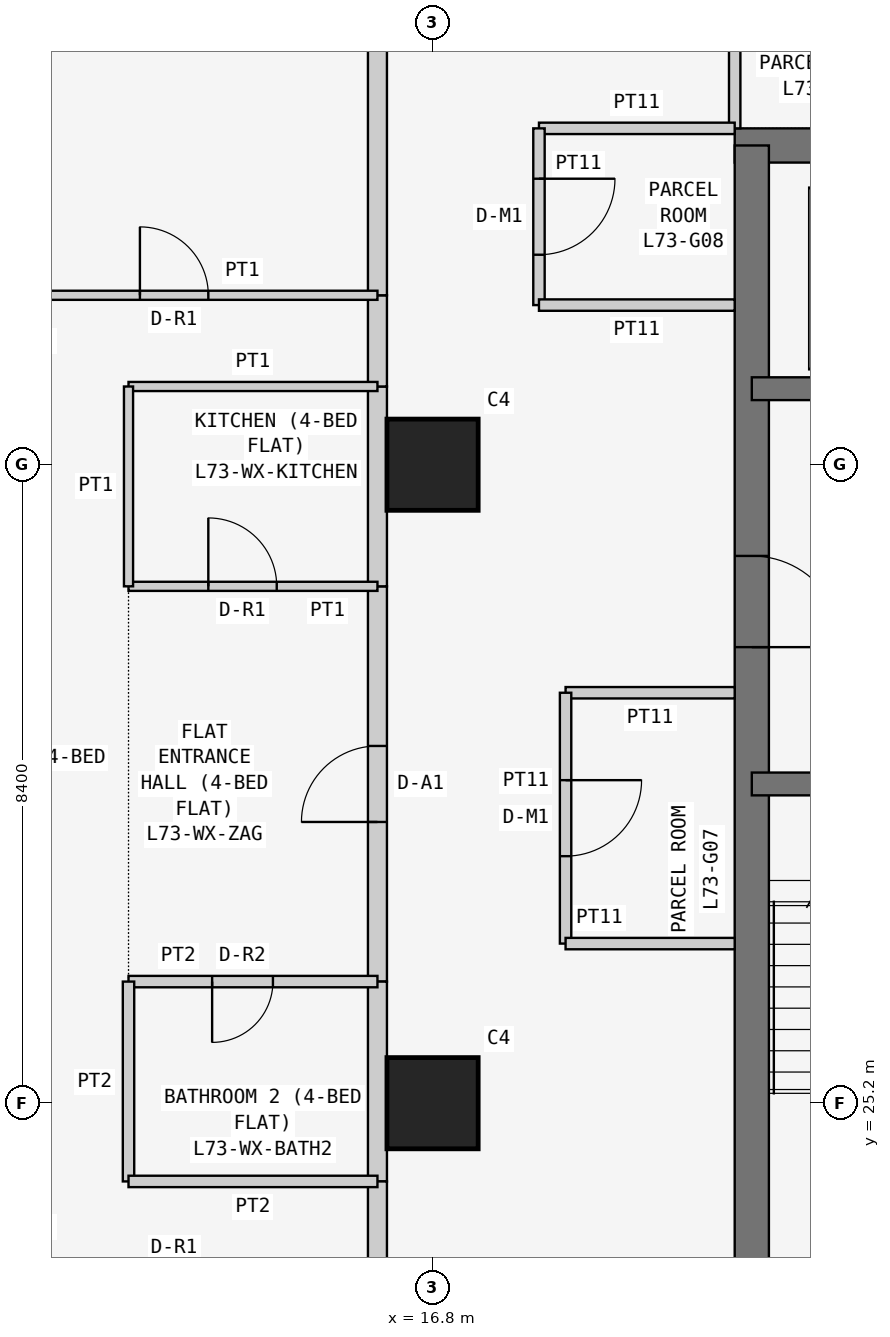
"""IFC4 building model, lengths in metres.
Left out: names, types, materials, properties, quantities, classifications, styles, units other than length and angle.
Written with IfcOpenShell. Run it as: python <this file> out.ifc"""

import sys

from ifc_helpers import new_model, si_unit, direction, frame, frame_2d, origin, origin_2d, place, context, subcontext, project, spatial, rectangle, extrude, element, fill, save


model = new_model("IFC4")
c1 = context("Model", 3, precision=1e-05, world=origin(), true_north=direction((0.0, 1.0)))
c2 = subcontext(c1, "Body", "Model", "MODEL_VIEW")
j1 = project(units=[si_unit("LENGTHUNIT", "METRE"), si_unit("PLANEANGLEUNIT", "RADIAN")], contexts=[c1])
p1 = place(None, origin())
s1 = spatial("IfcSite", under=j1, at=p1, CompositionType="ELEMENT")
p2 = place(p1, origin())
s2 = spatial("IfcBuilding", under=s1, at=p2, CompositionType="ELEMENT")
p3 = place(p2, frame((0.0, 0.0, 279.3)))
s3 = spatial("IfcBuildingStorey", under=s2, at=p3, CompositionType="ELEMENT", Elevation=279.3)
for number, where, z_axis, x_axis in (
    (1, (16.8, 25.2, 0.0), (0.0, 0.0, 1.0), (1.0, 0.0, 0.0)),
    (2, (16.8, 33.6, 0.0), (0.0, 0.0, 1.0), (1.0, 0.0, 0.0)),
):
    element("IfcColumn", number, at=place(p3, frame(where, z_axis=z_axis, x_axis=x_axis)), inside=s3, PredefinedType="COLUMN", context=c2, shape_type="SweptSolid", body=[
        extrude(rectangle(XDim=1.2, YDim=1.2, at=origin_2d()), origin(), (0.0, 0.0, 1.0), 3.6),
    ])
p4 = place(p3, frame((37.8, 37.8, 0.0), z_axis=(0.0, 0.0, 1.0), x_axis=(-1.0, 0.0, 0.0)))
e3 = element("IfcWall", 3, at=p4, inside=s3, PredefinedType="SHEAR", context=c2, shape_type="SweptSolid", body=[
    extrude(rectangle(XDim=17.025, YDim=0.45, at=frame_2d((8.513, 0.0))), origin(), (0.0, 0.0, 1.0), 3.6),
])
p5 = place(p3, frame((21.0, 37.8, 0.0), z_axis=(0.0, 0.0, 1.0), x_axis=(0.0, -1.0, 0.0)))
e4 = element("IfcWall", 4, at=p5, inside=s3, PredefinedType="SHEAR", context=c2, shape_type="SweptSolid", body=[
    extrude(rectangle(XDim=17.025, YDim=0.45, at=frame_2d((8.513, 0.0))), origin(), (0.0, 0.0, 1.0), 3.6),
])
p6 = place(p5, frame((5.4, 0.0, 0.0)))
e5 = element("IfcOpeningElement", 5, at=p6, cuts=e4, PredefinedType="OPENING", context=c2, shape_type="SweptSolid", body=[
    extrude(rectangle(XDim=1.2, YDim=2.1, at=frame_2d((0.6, 1.05))), frame((0.0, 0.235, 0.0), z_axis=(0.0, -1.0, 0.0), x_axis=(1.0, 0.0, 0.0)), (0.0, 0.0, 1.0), 0.47),
])
p7 = place(p3, frame((21.0, 29.4, 0.0), z_axis=(0.0, 0.0, 1.0), x_axis=(1.0, 0.0, 0.0)))
e6 = element("IfcWall", 6, at=p7, inside=s3, PredefinedType="SHEAR", context=c2, shape_type="SweptSolid", body=[
    extrude(rectangle(XDim=5.6, YDim=0.3, at=frame_2d((2.8, 0.0))), origin(), (0.0, 0.0, 1.0), 3.6),
])
p8 = place(p7, frame((2.3, 0.0, 0.0)))
e7 = element("IfcOpeningElement", 7, at=p8, cuts=e6, PredefinedType="OPENING", context=c2, shape_type="SweptSolid", body=[
    extrude(rectangle(XDim=1.2, YDim=2.1, at=frame_2d((0.6, 1.05))), frame((0.0, 0.16, 0.0), z_axis=(0.0, -1.0, 0.0), x_axis=(1.0, 0.0, 0.0)), (0.0, 0.0, 1.0), 0.32),
])
p9 = place(p3, frame((21.0, 34.6, 0.0), z_axis=(0.0, 0.0, 1.0), x_axis=(1.0, 0.0, 0.0)))
e8 = element("IfcWall", 8, at=p9, inside=s3, PredefinedType="SHEAR", context=c2, shape_type="SweptSolid", body=[
    extrude(rectangle(XDim=11.2, YDim=0.3, at=frame_2d((5.6, 0.0))), origin(), (0.0, 0.0, 1.0), 3.6),
])
p10 = place(p9, frame((9.35, 0.0, 0.0)))
e9 = element("IfcOpeningElement", 9, at=p10, cuts=e8, PredefinedType="OPENING", context=c2, shape_type="SweptSolid", body=[
    extrude(rectangle(XDim=0.9, YDim=2.1, at=frame_2d((0.45, 1.05))), frame((0.0, 0.16, 0.0), z_axis=(0.0, -1.0, 0.0), x_axis=(1.0, 0.0, 0.0)), (0.0, 0.0, 1.0), 0.32),
])
p11 = place(p9, frame((1.0, 0.0, 0.0)))
e10 = element("IfcOpeningElement", 10, at=p11, cuts=e8, PredefinedType="OPENING", context=c2, shape_type="SweptSolid", body=[
    extrude(rectangle(XDim=1.1, YDim=2.1, at=frame_2d((0.55, 1.05))), frame((0.0, 0.16, 0.0), z_axis=(0.0, -1.0, 0.0), x_axis=(1.0, 0.0, 0.0)), (0.0, 0.0, 1.0), 0.32),
])
p12 = place(p9, frame((3.65, 0.0, 0.0)))
e11 = element("IfcOpeningElement", 11, at=p12, cuts=e8, PredefinedType="OPENING", context=c2, shape_type="SweptSolid", body=[
    extrude(rectangle(XDim=1.1, YDim=2.1, at=frame_2d((0.55, 1.05))), frame((0.0, 0.16, 0.0), z_axis=(0.0, -1.0, 0.0), x_axis=(1.0, 0.0, 0.0)), (0.0, 0.0, 1.0), 0.32),
])
p13 = place(p9, frame((6.35, 0.0, 0.0)))
e12 = element("IfcOpeningElement", 12, at=p13, cuts=e8, PredefinedType="OPENING", context=c2, shape_type="SweptSolid", body=[
    extrude(rectangle(XDim=1.3, YDim=2.1, at=frame_2d((0.65, 1.05))), frame((0.0, 0.16, 0.0), z_axis=(0.0, -1.0, 0.0), x_axis=(1.0, 0.0, 0.0)), (0.0, 0.0, 1.0), 0.32),
])
p14 = place(p3, frame((20.775, 40.6, 0.0), z_axis=(0.0, 0.0, 1.0), x_axis=(0.0, -1.0, 0.0)))
e13 = element("IfcWall", 13, at=p14, inside=s3, PredefinedType="PARTITIONING", context=c2, shape_type="SweptSolid", body=[
    extrude(rectangle(XDim=2.575, YDim=0.15, at=frame_2d((1.288, 0.0))), origin(), (0.0, 0.0, 1.0), 3.45),
])
p15 = place(p3, frame((20.775, 30.6, 0.0), z_axis=(0.0, 0.0, 1.0), x_axis=(-1.0, 0.0, 0.0)))
e14 = element("IfcWall", 14, at=p15, inside=s3, PredefinedType="PARTITIONING", context=c2, shape_type="SweptSolid", body=[
    extrude(rectangle(XDim=2.225, YDim=0.15, at=frame_2d((1.112, 0.0))), origin(), (0.0, 0.0, 1.0), 3.45),
])
p16 = place(p3, frame((18.55, 30.6, 0.0), z_axis=(0.0, 0.0, 1.0), x_axis=(0.0, -1.0, 0.0)))
e15 = element("IfcWall", 15, at=p16, inside=s3, PredefinedType="PARTITIONING", context=c2, shape_type="SweptSolid", body=[
    extrude(rectangle(XDim=3.3, YDim=0.15, at=frame_2d((1.65, 0.0))), origin(), (0.0, 0.0, 1.0), 3.45),
])
p17 = place(p16, frame((1.15, 0.0, 0.0)))
e16 = element("IfcOpeningElement", 16, at=p17, cuts=e15, PredefinedType="OPENING", context=c2, shape_type="SweptSolid", body=[
    extrude(rectangle(XDim=1.0, YDim=2.1, at=frame_2d((0.5, 1.05))), frame((0.0, 0.085, 0.0), z_axis=(0.0, -1.0, 0.0), x_axis=(1.0, 0.0, 0.0)), (0.0, 0.0, 1.0), 0.17),
])
p18 = place(p3, frame((18.55, 27.3, 0.0), z_axis=(0.0, 0.0, 1.0), x_axis=(1.0, 0.0, 0.0)))
e17 = element("IfcWall", 17, at=p18, inside=s3, PredefinedType="PARTITIONING", context=c2, shape_type="SweptSolid", body=[
    extrude(rectangle(XDim=2.225, YDim=0.15, at=frame_2d((1.112, 0.0))), origin(), (0.0, 0.0, 1.0), 3.45),
])
p19 = place(p3, frame((20.775, 38.025, 0.0), z_axis=(0.0, 0.0, 1.0), x_axis=(-1.0, 0.0, 0.0)))
e18 = element("IfcWall", 18, at=p19, inside=s3, PredefinedType="PARTITIONING", context=c2, shape_type="SweptSolid", body=[
    extrude(rectangle(XDim=2.575, YDim=0.15, at=frame_2d((1.288, 0.0))), origin(), (0.0, 0.0, 1.0), 3.45),
])
p20 = place(p3, frame((18.2, 38.025, 0.0), z_axis=(0.0, 0.0, 1.0), x_axis=(0.0, -1.0, 0.0)))
e19 = element("IfcWall", 19, at=p20, inside=s3, PredefinedType="PARTITIONING", context=c2, shape_type="SweptSolid", body=[
    extrude(rectangle(XDim=2.325, YDim=0.15, at=frame_2d((1.163, 0.0))), origin(), (0.0, 0.0, 1.0), 3.45),
])
p21 = place(p20, frame((0.663, 0.0, 0.0)))
e20 = element("IfcOpeningElement", 20, at=p21, cuts=e19, PredefinedType="OPENING", context=c2, shape_type="SweptSolid", body=[
    extrude(rectangle(XDim=1.0, YDim=2.1, at=frame_2d((0.5, 1.05))), frame((0.0, 0.085, 0.0), z_axis=(0.0, -1.0, 0.0), x_axis=(1.0, 0.0, 0.0)), (0.0, 0.0, 1.0), 0.17),
])
p22 = place(p3, frame((18.2, 35.7, 0.0), z_axis=(0.0, 0.0, 1.0), x_axis=(1.0, 0.0, 0.0)))
e21 = element("IfcWall", 21, at=p22, inside=s3, PredefinedType="PARTITIONING", context=c2, shape_type="SweptSolid", body=[
    extrude(rectangle(XDim=2.575, YDim=0.15, at=frame_2d((1.288, 0.0))), origin(), (0.0, 0.0, 1.0), 3.45),
])
p23 = place(p3, frame((16.075, 26.8, 0.0), z_axis=(0.0, 0.0, 1.0), x_axis=(0.0, 1.0, 0.0)))
e22 = element("IfcWall", 22, at=p23, inside=s3, PredefinedType="PARTITIONING", context=c2, shape_type="SweptSolid", body=[
    extrude(rectangle(XDim=5.2, YDim=0.25, at=frame_2d((2.6, 0.0))), origin(), (0.0, 0.0, 1.0), 3.45),
])
p24 = place(p23, frame((2.1, 0.0, 0.0)))
e23 = element("IfcOpeningElement", 23, at=p24, cuts=e22, PredefinedType="OPENING", context=c2, shape_type="SweptSolid", body=[
    extrude(rectangle(XDim=1.0, YDim=2.1, at=frame_2d((0.5, 1.05))), frame((0.0, 0.135, 0.0), z_axis=(0.0, -1.0, 0.0), x_axis=(1.0, 0.0, 0.0)), (0.0, 0.0, 1.0), 0.27),
])
p25 = place(p3, frame((16.075, 24.171, 0.0), z_axis=(0.0, 0.0, 1.0), x_axis=(0.0, 1.0, 0.0)))
e24 = element("IfcWall", 24, at=p25, inside=s3, PredefinedType="PARTITIONING", context=c2, shape_type="SweptSolid", body=[
    extrude(rectangle(XDim=2.629, YDim=0.25, at=frame_2d((1.314, 0.0))), origin(), (0.0, 0.0, 1.0), 3.45),
])
p26 = place(p3, frame((16.075, 32.0, 0.0), z_axis=(0.0, 0.0, 1.0), x_axis=(0.0, 1.0, 0.0)))
e25 = element("IfcWall", 25, at=p26, inside=s3, PredefinedType="PARTITIONING", context=c2, shape_type="SweptSolid", body=[
    extrude(rectangle(XDim=2.629, YDim=0.25, at=frame_2d((1.314, 0.0))), origin(), (0.0, 0.0, 1.0), 3.45),
])
p27 = place(p3, frame((16.075, 22.971, 0.0), z_axis=(0.0, 0.0, 1.0), x_axis=(0.0, 1.0, 0.0)))
e26 = element("IfcWall", 26, at=p27, inside=s3, PredefinedType="PARTITIONING", context=c2, shape_type="SweptSolid", body=[
    extrude(rectangle(XDim=1.2, YDim=0.25, at=frame_2d((0.6, 0.0))), origin(), (0.0, 0.0, 1.0), 3.45),
])
p28 = place(p3, frame((16.075, 34.629, 0.0), z_axis=(0.0, 0.0, 1.0), x_axis=(0.0, 1.0, 0.0)))
e27 = element("IfcWall", 27, at=p28, inside=s3, PredefinedType="PARTITIONING", context=c2, shape_type="SweptSolid", body=[
    extrude(rectangle(XDim=1.2, YDim=0.25, at=frame_2d((0.6, 0.0))), origin(), (0.0, 0.0, 1.0), 3.45),
])
p29 = place(p3, frame((16.075, 35.829, 0.0), z_axis=(0.0, 0.0, 1.0), x_axis=(0.0, 1.0, 0.0)))
e28 = element("IfcWall", 28, at=p29, inside=s3, PredefinedType="PARTITIONING", context=c2, shape_type="SweptSolid", body=[
    extrude(rectangle(XDim=6.871, YDim=0.25, at=frame_2d((3.436, 0.0))), origin(), (0.0, 0.0, 1.0), 3.45),
])
p30 = place(p3, frame((12.8, 26.8, 0.0), z_axis=(0.0, 0.0, 1.0), x_axis=(1.0, 0.0, 0.0)))
e29 = element("IfcWall", 29, at=p30, inside=s3, PredefinedType="PARTITIONING", context=c2, shape_type="SweptSolid", body=[
    extrude(rectangle(XDim=3.275, YDim=0.15, at=frame_2d((1.637, 0.0))), origin(), (0.0, 0.0, 1.0), 3.45),
])
p31 = place(p30, frame((1.1, 0.0, 0.0)))
e30 = element("IfcOpeningElement", 30, at=p31, cuts=e29, PredefinedType="OPENING", context=c2, shape_type="SweptSolid", body=[
    extrude(rectangle(XDim=0.8, YDim=2.1, at=frame_2d((0.4, 1.05))), frame((0.0, 0.085, 0.0), z_axis=(0.0, -1.0, 0.0), x_axis=(1.0, 0.0, 0.0)), (0.0, 0.0, 1.0), 0.17),
])
p32 = place(p3, frame((16.075, 32.0, 0.0), z_axis=(0.0, 0.0, 1.0), x_axis=(-1.0, 0.0, 0.0)))
e31 = element("IfcWall", 31, at=p32, inside=s3, PredefinedType="PARTITIONING", context=c2, shape_type="SweptSolid", body=[
    extrude(rectangle(XDim=3.275, YDim=0.12, at=frame_2d((1.637, 0.0))), origin(), (0.0, 0.0, 1.0), 3.45),
])
p33 = place(p32, frame((1.325, 0.0, 0.0)))
e32 = element("IfcOpeningElement", 32, at=p33, cuts=e31, PredefinedType="OPENING", context=c2, shape_type="SweptSolid", body=[
    extrude(rectangle(XDim=0.9, YDim=2.1, at=frame_2d((0.45, 1.05))), frame((0.0, 0.07, 0.0), z_axis=(0.0, -1.0, 0.0), x_axis=(1.0, 0.0, 0.0)), (0.0, 0.0, 1.0), 0.14),
])
p34 = place(p3, frame((12.8, 26.8, 0.0), z_axis=(0.0, 0.0, 1.0), x_axis=(0.0, -1.0, 0.0)))
e33 = element("IfcWall", 33, at=p34, inside=s3, PredefinedType="PARTITIONING", context=c2, shape_type="SweptSolid", body=[
    extrude(rectangle(XDim=2.629, YDim=0.15, at=frame_2d((1.314, 0.0))), origin(), (0.0, 0.0, 1.0), 3.45),
])
p35 = place(p3, frame((12.8, 24.171, 0.0), z_axis=(0.0, 0.0, 1.0), x_axis=(1.0, 0.0, 0.0)))
e34 = element("IfcWall", 34, at=p35, inside=s3, PredefinedType="PARTITIONING", context=c2, shape_type="SweptSolid", body=[
    extrude(rectangle(XDim=3.275, YDim=0.15, at=frame_2d((1.637, 0.0))), origin(), (0.0, 0.0, 1.0), 3.45),
])
p36 = place(p3, frame((16.075, 34.629, 0.0), z_axis=(0.0, 0.0, 1.0), x_axis=(-1.0, 0.0, 0.0)))
e35 = element("IfcWall", 35, at=p36, inside=s3, PredefinedType="PARTITIONING", context=c2, shape_type="SweptSolid", body=[
    extrude(rectangle(XDim=3.275, YDim=0.12, at=frame_2d((1.637, 0.0))), origin(), (0.0, 0.0, 1.0), 3.45),
])
p37 = place(p3, frame((12.8, 34.629, 0.0), z_axis=(0.0, 0.0, 1.0), x_axis=(0.0, -1.0, 0.0)))
e36 = element("IfcWall", 36, at=p37, inside=s3, PredefinedType="PARTITIONING", context=c2, shape_type="SweptSolid", body=[
    extrude(rectangle(XDim=2.629, YDim=0.12, at=frame_2d((1.314, 0.0))), origin(), (0.0, 0.0, 1.0), 3.45),
])
p38 = place(p3, frame((11.0, 35.829, 0.0), z_axis=(0.0, 0.0, 1.0), x_axis=(1.0, 0.0, 0.0)))
e37 = element("IfcWall", 37, at=p38, inside=s3, PredefinedType="PARTITIONING", context=c2, shape_type="SweptSolid", body=[
    extrude(rectangle(XDim=5.075, YDim=0.12, at=frame_2d((2.538, 0.0))), origin(), (0.0, 0.0, 1.0), 3.45),
])
p39 = place(p38, frame((1.95, 0.0, 0.0)))
e38 = element("IfcOpeningElement", 38, at=p39, cuts=e37, PredefinedType="OPENING", context=c2, shape_type="SweptSolid", body=[
    extrude(rectangle(XDim=0.9, YDim=2.1, at=frame_2d((0.45, 1.05))), frame((0.0, 0.07, 0.0), z_axis=(0.0, -1.0, 0.0), x_axis=(1.0, 0.0, 0.0)), (0.0, 0.0, 1.0), 0.14),
])
p40 = place(p17, origin())
e39 = element("IfcDoor", 39, at=p40, inside=s3, OperationType="SINGLE_SWING_LEFT", PredefinedType="DOOR", context=c2, shape_type="SweptSolid", body=[
    extrude(rectangle(XDim=1.0, YDim=2.1, at=frame_2d((0.5, 1.05))), frame((0.0, 0.025, 0.0), z_axis=(0.0, -1.0, 0.0), x_axis=(1.0, 0.0, 0.0)), (0.0, 0.0, 1.0), 0.05),
])
fill(e16, e39)
p41 = place(p21, origin())
e40 = element("IfcDoor", 40, at=p41, inside=s3, OperationType="SINGLE_SWING_LEFT", PredefinedType="DOOR", context=c2, shape_type="SweptSolid", body=[
    extrude(rectangle(XDim=1.0, YDim=2.1, at=frame_2d((0.5, 1.05))), frame((0.0, 0.025, 0.0), z_axis=(0.0, -1.0, 0.0), x_axis=(1.0, 0.0, 0.0)), (0.0, 0.0, 1.0), 0.05),
])
fill(e20, e40)
p42 = place(p24, origin())
e41 = element("IfcDoor", 41, at=p42, inside=s3, OperationType="SINGLE_SWING_LEFT", PredefinedType="DOOR", context=c2, shape_type="SweptSolid", body=[
    extrude(rectangle(XDim=1.0, YDim=2.1, at=frame_2d((0.5, 1.05))), frame((0.0, 0.025, 0.0), z_axis=(0.0, -1.0, 0.0), x_axis=(1.0, 0.0, 0.0)), (0.0, 0.0, 1.0), 0.05),
])
fill(e23, e41)
p43 = place(p31, frame((0.8, 0.0, 0.0), z_axis=(0.0, 0.0, 1.0), x_axis=(-1.0, 0.0, 0.0)))
e42 = element("IfcDoor", 42, at=p43, inside=s3, OperationType="SINGLE_SWING_RIGHT", PredefinedType="DOOR", context=c2, shape_type="SweptSolid", body=[
    extrude(rectangle(XDim=0.8, YDim=2.1, at=frame_2d((0.4, 1.05))), frame((0.0, 0.025, 0.0), z_axis=(0.0, -1.0, 0.0), x_axis=(1.0, 0.0, 0.0)), (0.0, 0.0, 1.0), 0.05),
])
fill(e30, e42)
p44 = place(p33, frame((0.9, 0.0, 0.0), z_axis=(0.0, 0.0, 1.0), x_axis=(-1.0, 0.0, 0.0)))
e43 = element("IfcDoor", 43, at=p44, inside=s3, OperationType="SINGLE_SWING_LEFT", PredefinedType="DOOR", context=c2, shape_type="SweptSolid", body=[
    extrude(rectangle(XDim=0.9, YDim=2.1, at=frame_2d((0.45, 1.05))), frame((0.0, 0.025, 0.0), z_axis=(0.0, -1.0, 0.0), x_axis=(1.0, 0.0, 0.0)), (0.0, 0.0, 1.0), 0.05),
])
fill(e32, e43)
p45 = place(p39, origin())
e44 = element("IfcDoor", 44, at=p45, inside=s3, OperationType="SINGLE_SWING_LEFT", PredefinedType="DOOR", context=c2, shape_type="SweptSolid", body=[
    extrude(rectangle(XDim=0.9, YDim=2.1, at=frame_2d((0.45, 1.05))), frame((0.0, 0.025, 0.0), z_axis=(0.0, -1.0, 0.0), x_axis=(1.0, 0.0, 0.0)), (0.0, 0.0, 1.0), 0.05),
])
fill(e38, e44)
p46 = place(p6, origin())
e45 = element("IfcDoor", 45, at=p46, inside=s3, OperationType="SINGLE_SWING_RIGHT", PredefinedType="DOOR", context=c2, shape_type="SweptSolid", body=[
    extrude(rectangle(XDim=1.2, YDim=2.1, at=frame_2d((0.6, 1.05))), frame((0.0, 0.025, 0.0), z_axis=(0.0, -1.0, 0.0), x_axis=(1.0, 0.0, 0.0)), (0.0, 0.0, 1.0), 0.05),
])
fill(e5, e45)
save(model, sys.argv[1])
